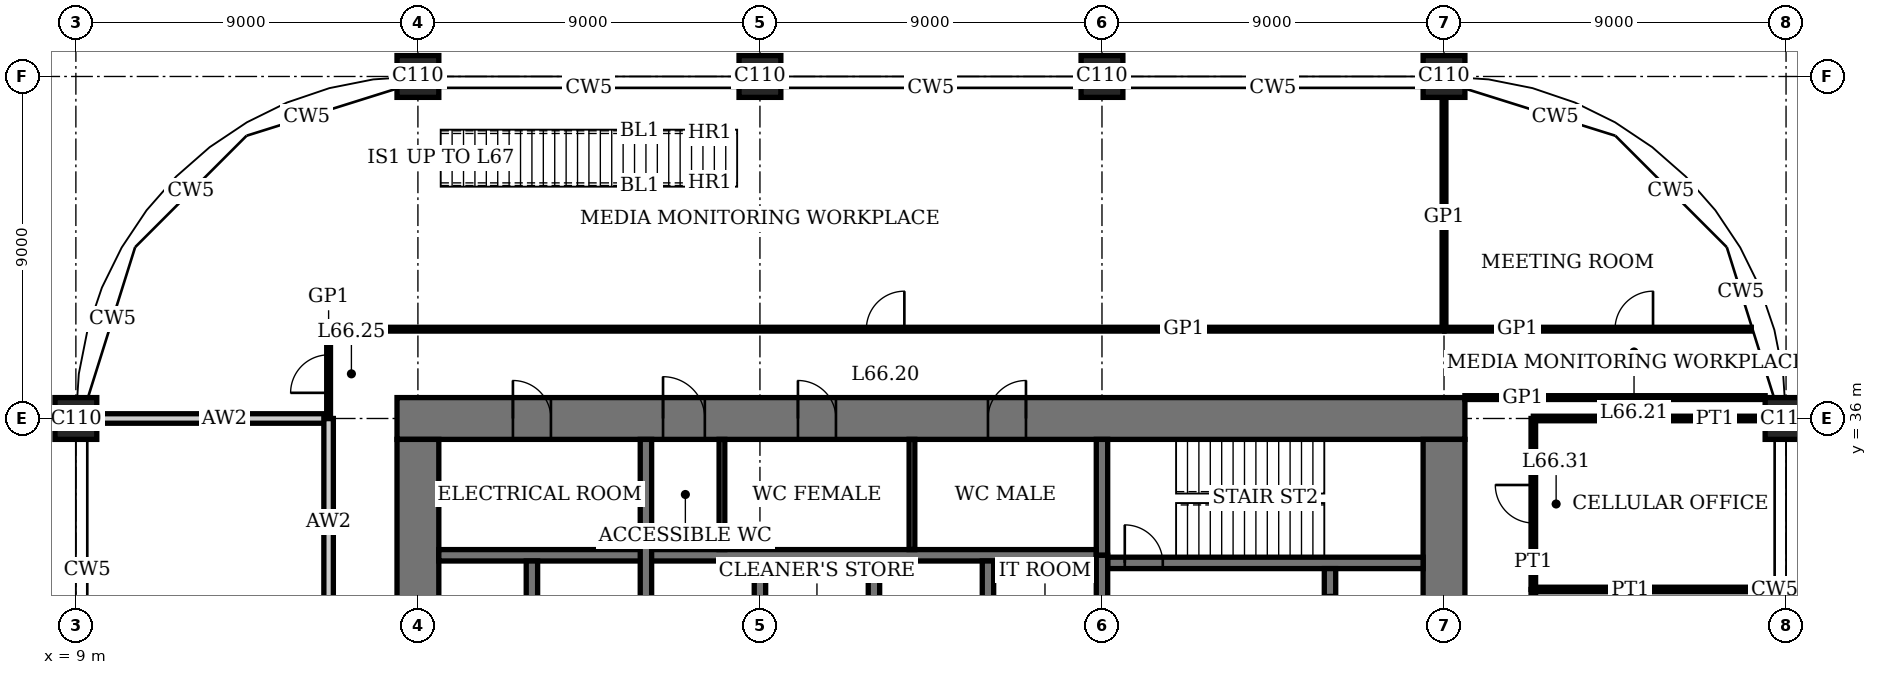
"""IFC4 building model, lengths in metres.
Left out: names, types, materials, properties, quantities, classifications, styles, units other than length and angle.
Written with IfcOpenShell. Run it as: python <this file> out.ifc"""

import sys

from ifc_helpers import new_model, si_unit, direction, frame, frame_2d, origin, origin_2d, place, context, subcontext, project, spatial, rectangle, extrude, element, fill, save


model = new_model("IFC4")
c1 = context("Model", 3, precision=1e-05, world=origin(), true_north=direction((0.0, 1.0)))
c2 = subcontext(c1, "Body", "Model", "MODEL_VIEW")
j1 = project(units=[si_unit("LENGTHUNIT", "METRE"), si_unit("PLANEANGLEUNIT", "RADIAN")], contexts=[c1])
p1 = place(None, origin())
s1 = spatial("IfcSite", under=j1, at=p1, CompositionType="ELEMENT")
p2 = place(p1, origin())
s2 = spatial("IfcBuilding", under=s1, at=p2, CompositionType="ELEMENT")
p3 = place(p2, frame((0.0, 0.0, 271.4)))
s3 = spatial("IfcBuildingStorey", under=s2, at=p3, CompositionType="ELEMENT", Elevation=271.4)
for number, where, z_axis, x_axis in (
    (1, (9.0, 36.0, 0.0), (0.0, 0.0, 1.0), (1.0, 0.0, 0.0)),
    (2, (18.0, 45.0, 0.0), (0.0, 0.0, 1.0), (1.0, 0.0, 0.0)),
    (3, (27.0, 45.0, 0.0), (0.0, 0.0, 1.0), (1.0, 0.0, 0.0)),
    (4, (36.0, 45.0, 0.0), (0.0, 0.0, 1.0), (1.0, 0.0, 0.0)),
    (5, (45.0, 45.0, 0.0), (0.0, 0.0, 1.0), (1.0, 0.0, 0.0)),
    (6, (54.0, 36.0, 0.0), (0.0, 0.0, 1.0), (1.0, 0.0, 0.0)),
):
    element("IfcColumn", number, at=place(p3, frame(where, z_axis=z_axis, x_axis=x_axis)), inside=s3, PredefinedType="COLUMN", context=c2, shape_type="SweptSolid", body=[
        extrude(rectangle(XDim=1.1, YDim=1.1, at=origin_2d()), origin(), (0.0, 0.0, 1.0), 4.0),
    ])
p4 = place(p3, frame((45.55, 36.0, 0.0), z_axis=(0.0, 0.0, 1.0), x_axis=(-1.0, 0.0, 0.0)))
e7 = element("IfcWall", 7, at=p4, inside=s3, PredefinedType="SHEAR", context=c2, shape_type="SweptSolid", body=[
    extrude(rectangle(XDim=28.1, YDim=1.1, at=frame_2d((14.05, 0.0))), origin(), (0.0, 0.0, 1.0), 4.0),
])
p5 = place(p4, frame((11.55, 0.0, 0.0)))
e8 = element("IfcOpeningElement", 8, at=p5, cuts=e7, PredefinedType="OPENING", context=c2, shape_type="SweptSolid", body=[
    extrude(rectangle(XDim=1.0, YDim=2.4, at=frame_2d((0.5, 1.2))), frame((0.0, 0.56, 0.0), z_axis=(0.0, -1.0, 0.0), x_axis=(1.0, 0.0, 0.0)), (0.0, 0.0, 1.0), 1.12),
])
p6 = place(p4, frame((16.55, 0.0, 0.0)))
e9 = element("IfcOpeningElement", 9, at=p6, cuts=e7, PredefinedType="OPENING", context=c2, shape_type="SweptSolid", body=[
    extrude(rectangle(XDim=1.0, YDim=2.4, at=frame_2d((0.5, 1.2))), frame((0.0, 0.56, 0.0), z_axis=(0.0, -1.0, 0.0), x_axis=(1.0, 0.0, 0.0)), (0.0, 0.0, 1.0), 1.12),
])
p7 = place(p4, frame((20.0, 0.0, 0.0)))
e10 = element("IfcOpeningElement", 10, at=p7, cuts=e7, PredefinedType="OPENING", context=c2, shape_type="SweptSolid", body=[
    extrude(rectangle(XDim=1.1, YDim=2.4, at=frame_2d((0.55, 1.2))), frame((0.0, 0.56, 0.0), z_axis=(0.0, -1.0, 0.0), x_axis=(1.0, 0.0, 0.0)), (0.0, 0.0, 1.0), 1.12),
])
p8 = place(p4, frame((24.05, 0.0, 0.0)))
e11 = element("IfcOpeningElement", 11, at=p8, cuts=e7, PredefinedType="OPENING", context=c2, shape_type="SweptSolid", body=[
    extrude(rectangle(XDim=1.0, YDim=2.4, at=frame_2d((0.5, 1.2))), frame((0.0, 0.56, 0.0), z_axis=(0.0, -1.0, 0.0), x_axis=(1.0, 0.0, 0.0)), (0.0, 0.0, 1.0), 1.12),
])
p9 = place(p3, frame((18.0, 35.45, 0.0), z_axis=(0.0, 0.0, 1.0), x_axis=(0.0, -1.0, 0.0)))
e12 = element("IfcWall", 12, at=p9, inside=s3, PredefinedType="SHEAR", context=c2, shape_type="SweptSolid", body=[
    extrude(rectangle(XDim=16.9, YDim=1.1, at=frame_2d((8.45, 0.0))), origin(), (0.0, 0.0, 1.0), 4.0),
])
p10 = place(p9, frame((8.45, 0.0, 0.0)))
e13 = element("IfcOpeningElement", 13, at=p10, cuts=e12, PredefinedType="OPENING", context=c2, shape_type="SweptSolid", body=[
    extrude(rectangle(XDim=1.8, YDim=2.4, at=frame_2d((0.9, 1.2))), frame((0.0, 0.56, 0.0), z_axis=(0.0, -1.0, 0.0), x_axis=(1.0, 0.0, 0.0)), (0.0, 0.0, 1.0), 1.12),
])
p11 = place(p3, frame((45.0, 18.55, 0.0), z_axis=(0.0, 0.0, 1.0), x_axis=(0.0, 1.0, 0.0)))
e14 = element("IfcWall", 14, at=p11, inside=s3, PredefinedType="SHEAR", context=c2, shape_type="SweptSolid", body=[
    extrude(rectangle(XDim=16.9, YDim=1.1, at=frame_2d((8.45, 0.0))), origin(), (0.0, 0.0, 1.0), 4.0),
])
p12 = place(p11, frame((8.45, 0.0, 0.0)))
e15 = element("IfcOpeningElement", 15, at=p12, cuts=e14, PredefinedType="OPENING", context=c2, shape_type="SweptSolid", body=[
    extrude(rectangle(XDim=1.8, YDim=2.4, at=frame_2d((0.9, 1.2))), frame((0.0, 0.56, 0.0), z_axis=(0.0, -1.0, 0.0), x_axis=(1.0, 0.0, 0.0)), (0.0, 0.0, 1.0), 1.12),
])
p13 = place(p3, frame((36.15, 32.2, 0.0), z_axis=(0.0, 0.0, 1.0), x_axis=(1.0, 0.0, 0.0)))
e16 = element("IfcWall", 16, at=p13, inside=s3, PredefinedType="SHEAR", context=c2, shape_type="SweptSolid", body=[
    extrude(rectangle(XDim=8.3, YDim=0.3, at=frame_2d((4.15, 0.0))), origin(), (0.0, 0.0, 1.0), 4.0),
])
p14 = place(p13, frame((0.45, 0.0, 0.0)))
e17 = element("IfcOpeningElement", 17, at=p14, cuts=e16, PredefinedType="OPENING", context=c2, shape_type="SweptSolid", body=[
    extrude(rectangle(XDim=1.0, YDim=2.4, at=frame_2d((0.5, 1.2))), frame((0.0, 0.16, 0.0), z_axis=(0.0, -1.0, 0.0), x_axis=(1.0, 0.0, 0.0)), (0.0, 0.0, 1.0), 0.32),
])
p15 = place(p3, frame((36.0, 32.4, 0.0), z_axis=(0.0, 0.0, 1.0), x_axis=(0.0, 1.0, 0.0)))
e18 = element("IfcWall", 18, at=p15, inside=s3, PredefinedType="SHEAR", context=c2, shape_type="SweptSolid", body=[
    extrude(rectangle(XDim=3.05, YDim=0.3, at=frame_2d((1.525, 0.0))), origin(), (0.0, 0.0, 1.0), 4.0),
])
p16 = place(p3, frame((42.0, 29.55, 0.0), z_axis=(0.0, 0.0, 1.0), x_axis=(0.0, 1.0, 0.0)))
e19 = element("IfcWall", 19, at=p16, inside=s3, PredefinedType="SHEAR", context=c2, shape_type="SweptSolid", body=[
    extrude(rectangle(XDim=2.5, YDim=0.3, at=frame_2d((1.25, 0.0))), origin(), (0.0, 0.0, 1.0), 4.0),
])
p17 = place(p16, frame((0.7, 0.0, 0.0)))
e20 = element("IfcOpeningElement", 20, at=p17, cuts=e19, PredefinedType="OPENING", context=c2, shape_type="SweptSolid", body=[
    extrude(rectangle(XDim=1.1, YDim=2.4, at=frame_2d((0.55, 1.2))), frame((0.0, 0.16, 0.0), z_axis=(0.0, -1.0, 0.0), x_axis=(1.0, 0.0, 0.0)), (0.0, 0.0, 1.0), 0.32),
])
p18 = place(p3, frame((18.55, 32.4, 0.0), z_axis=(0.0, 0.0, 1.0), x_axis=(1.0, 0.0, 0.0)))
e21 = element("IfcWall", 21, at=p18, inside=s3, PredefinedType="SHEAR", context=c2, shape_type="SweptSolid", body=[
    extrude(rectangle(XDim=17.3, YDim=0.3, at=frame_2d((8.65, 0.0))), origin(), (0.0, 0.0, 1.0), 4.0),
])
for number, where, z_axis, x_axis in (
    (22, (33.0, 29.55, 0.0), (0.0, 0.0, 1.0), (0.0, 1.0, 0.0)),
    (23, (30.0, 29.55, 0.0), (0.0, 0.0, 1.0), (0.0, 1.0, 0.0)),
    (24, (27.0, 29.55, 0.0), (0.0, 0.0, 1.0), (0.0, 1.0, 0.0)),
):
    element("IfcWall", number, at=place(p3, frame(where, z_axis=z_axis, x_axis=x_axis)), inside=s3, PredefinedType="SHEAR", context=c2, shape_type="SweptSolid", body=[
        extrude(rectangle(XDim=2.7, YDim=0.3, at=frame_2d((1.35, 0.0))), origin(), (0.0, 0.0, 1.0), 4.0),
    ])
p19 = place(p3, frame((24.0, 29.55, 0.0), z_axis=(0.0, 0.0, 1.0), x_axis=(0.0, 1.0, 0.0)))
e25 = element("IfcWall", 25, at=p19, inside=s3, PredefinedType="SHEAR", context=c2, shape_type="SweptSolid", body=[
    extrude(rectangle(XDim=5.9, YDim=0.3, at=frame_2d((2.95, 0.0))), origin(), (0.0, 0.0, 1.0), 4.0),
])
p20 = place(p3, frame((21.0, 29.55, 0.0), z_axis=(0.0, 0.0, 1.0), x_axis=(0.0, 1.0, 0.0)))
e26 = element("IfcWall", 26, at=p20, inside=s3, PredefinedType="SHEAR", context=c2, shape_type="SweptSolid", body=[
    extrude(rectangle(XDim=2.7, YDim=0.3, at=frame_2d((1.35, 0.0))), origin(), (0.0, 0.0, 1.0), 4.0),
])
p21 = place(p3, frame((36.0, 29.55, 0.0), z_axis=(0.0, 0.0, 1.0), x_axis=(0.0, 1.0, 0.0)))
e27 = element("IfcWall", 27, at=p21, inside=s3, PredefinedType="SHEAR", context=c2, shape_type="SweptSolid", body=[
    extrude(rectangle(XDim=2.85, YDim=0.3, at=frame_2d((1.425, 0.0))), origin(), (0.0, 0.0, 1.0), 4.0),
])
p22 = place(p3, frame((47.35, 31.5, 0.0), z_axis=(0.0, 0.0, 1.0), x_axis=(1.0, 0.0, 0.0)))
e28 = element("IfcWall", 28, at=p22, inside=s3, PredefinedType="PARTITIONING", context=c2, shape_type="SweptSolid", body=[
    extrude(rectangle(XDim=6.34, YDim=0.12, at=frame_2d((3.17, 0.0))), origin(), (0.0, 0.0, 1.0), 3.1),
])
p23 = place(p3, frame((9.55, 36.0, 0.0), z_axis=(0.0, 0.0, 1.0), x_axis=(1.0, 0.0, 0.0)))
e29 = element("IfcWall", 29, at=p23, inside=s3, PredefinedType="PARTITIONING", context=c2, shape_type="SweptSolid", body=[
    extrude(rectangle(XDim=6.1, YDim=0.25, at=frame_2d((3.05, 0.0))), origin(), (0.0, 0.0, 1.0), 3.05),
])
p24 = place(p3, frame((47.35, 36.0, 0.0), z_axis=(0.0, 0.0, 1.0), x_axis=(1.0, 0.0, 0.0)))
e30 = element("IfcWall", 30, at=p24, inside=s3, PredefinedType="PARTITIONING", context=c2, shape_type="SweptSolid", body=[
    extrude(rectangle(XDim=6.1, YDim=0.12, at=frame_2d((3.05, 0.0))), origin(), (0.0, 0.0, 1.0), 3.05),
])
p25 = place(p3, frame((45.55, 36.55, 0.0), z_axis=(0.0, 0.0, 1.0), x_axis=(1.0, 0.0, 0.0)))
e31 = element("IfcWall", 31, at=p25, inside=s3, PredefinedType="PARTITIONING", context=c2, shape_type="SweptSolid", body=[
    extrude(rectangle(XDim=7.9, YDim=0.1, at=frame_2d((3.95, 0.0))), origin(), (0.0, 0.0, 1.0), 3.75),
])
p26 = place(p3, frame((15.6, 38.35, 0.0), z_axis=(0.0, 0.0, 1.0), x_axis=(1.0, 0.0, 0.0)))
e32 = element("IfcWall", 32, at=p26, inside=s3, PredefinedType="PARTITIONING", context=c2, shape_type="SweptSolid", body=[
    extrude(rectangle(XDim=29.4, YDim=0.1, at=frame_2d((14.7, 0.0))), origin(), (0.0, 0.0, 1.0), 3.75),
])
p27 = place(p26, frame((14.2, 0.0, 0.0)))
e33 = element("IfcOpeningElement", 33, at=p27, cuts=e32, PredefinedType="OPENING", context=c2, shape_type="SweptSolid", body=[
    extrude(rectangle(XDim=1.0, YDim=2.4, at=frame_2d((0.5, 1.2))), frame((0.0, 0.06, 0.0), z_axis=(0.0, -1.0, 0.0), x_axis=(1.0, 0.0, 0.0)), (0.0, 0.0, 1.0), 0.12),
])
p28 = place(p3, frame((45.019, 38.35, 0.0), z_axis=(0.0, 0.0, 1.0), x_axis=(1.0, 0.0, 0.0)))
e34 = element("IfcWall", 34, at=p28, inside=s3, PredefinedType="PARTITIONING", context=c2, shape_type="SweptSolid", body=[
    extrude(rectangle(XDim=8.066, YDim=0.1, at=frame_2d((4.033, 0.0))), origin(), (0.0, 0.0, 1.0), 3.75),
])
p29 = place(p28, frame((4.481, 0.0, 0.0)))
e35 = element("IfcOpeningElement", 35, at=p29, cuts=e34, PredefinedType="OPENING", context=c2, shape_type="SweptSolid", body=[
    extrude(rectangle(XDim=1.0, YDim=2.4, at=frame_2d((0.5, 1.2))), frame((0.0, 0.06, 0.0), z_axis=(0.0, -1.0, 0.0), x_axis=(1.0, 0.0, 0.0)), (0.0, 0.0, 1.0), 0.12),
])
p30 = place(p3, frame((15.65, 22.5, 0.0), z_axis=(0.0, 0.0, 1.0), x_axis=(0.0, 1.0, 0.0)))
e36 = element("IfcWall", 36, at=p30, inside=s3, PredefinedType="PARTITIONING", context=c2, shape_type="SweptSolid", body=[
    extrude(rectangle(XDim=13.5, YDim=0.25, at=frame_2d((6.75, 0.0))), origin(), (0.0, 0.0, 1.0), 3.75),
])
p31 = place(p30, frame((5.85, 0.0, 0.0)))
e37 = element("IfcOpeningElement", 37, at=p31, cuts=e36, PredefinedType="OPENING", context=c2, shape_type="SweptSolid", body=[
    extrude(rectangle(XDim=1.8, YDim=2.4, at=frame_2d((0.9, 1.2))), frame((0.0, 0.135, 0.0), z_axis=(0.0, -1.0, 0.0), x_axis=(1.0, 0.0, 0.0)), (0.0, 0.0, 1.0), 0.27),
])
p32 = place(p3, frame((15.65, 36.0, 0.0), z_axis=(0.0, 0.0, 1.0), x_axis=(0.0, 1.0, 0.0)))
e38 = element("IfcWall", 38, at=p32, inside=s3, PredefinedType="PARTITIONING", context=c2, shape_type="SweptSolid", body=[
    extrude(rectangle(XDim=2.35, YDim=0.1, at=frame_2d((1.175, 0.0))), origin(), (0.0, 0.0, 1.0), 3.75),
])
p33 = place(p32, frame((0.675, 0.0, 0.0)))
e39 = element("IfcOpeningElement", 39, at=p33, cuts=e38, PredefinedType="OPENING", context=c2, shape_type="SweptSolid", body=[
    extrude(rectangle(XDim=1.0, YDim=2.4, at=frame_2d((0.5, 1.2))), frame((0.0, 0.06, 0.0), z_axis=(0.0, -1.0, 0.0), x_axis=(1.0, 0.0, 0.0)), (0.0, 0.0, 1.0), 0.12),
])
p34 = place(p3, frame((45.0, 38.35, 0.0), z_axis=(0.0, 0.0, 1.0), x_axis=(0.0, 1.0, 0.0)))
e40 = element("IfcWall", 40, at=p34, inside=s3, PredefinedType="PARTITIONING", context=c2, shape_type="SweptSolid", body=[
    extrude(rectangle(XDim=6.1, YDim=0.1, at=frame_2d((3.05, 0.0))), origin(), (0.0, 0.0, 1.0), 3.05),
])
p35 = place(p3, frame((47.35, 27.0, 0.0), z_axis=(0.0, 0.0, 1.0), x_axis=(0.0, 1.0, 0.0)))
e41 = element("IfcWall", 41, at=p35, inside=s3, PredefinedType="PARTITIONING", context=c2, shape_type="SweptSolid", body=[
    extrude(rectangle(XDim=4.5, YDim=0.12, at=frame_2d((2.25, 0.0))), origin(), (0.0, 0.0, 1.0), 3.75),
])
p36 = place(p35, frame((1.75, 0.0, 0.0)))
e42 = element("IfcOpeningElement", 42, at=p36, cuts=e41, PredefinedType="OPENING", context=c2, shape_type="SweptSolid", body=[
    extrude(rectangle(XDim=1.0, YDim=2.4, at=frame_2d((0.5, 1.2))), frame((0.0, 0.07, 0.0), z_axis=(0.0, -1.0, 0.0), x_axis=(1.0, 0.0, 0.0)), (0.0, 0.0, 1.0), 0.14),
])
p37 = place(p3, frame((47.35, 31.5, 0.0), z_axis=(0.0, 0.0, 1.0), x_axis=(0.0, 1.0, 0.0)))
e43 = element("IfcWall", 43, at=p37, inside=s3, PredefinedType="PARTITIONING", context=c2, shape_type="SweptSolid", body=[
    extrude(rectangle(XDim=4.5, YDim=0.12, at=frame_2d((2.25, 0.0))), origin(), (0.0, 0.0, 1.0), 3.75),
])
p38 = place(p37, frame((1.75, 0.0, 0.0)))
e44 = element("IfcOpeningElement", 44, at=p38, cuts=e43, PredefinedType="OPENING", context=c2, shape_type="SweptSolid", body=[
    extrude(rectangle(XDim=1.0, YDim=2.4, at=frame_2d((0.5, 1.2))), frame((0.0, 0.07, 0.0), z_axis=(0.0, -1.0, 0.0), x_axis=(1.0, 0.0, 0.0)), (0.0, 0.0, 1.0), 0.14),
])
for number, where, z_axis, x_axis in (
    (45, (31.0, 32.55, 0.0), (0.0, 0.0, 1.0), (0.0, 1.0, 0.0)),
    (46, (26.0, 32.55, 0.0), (0.0, 0.0, 1.0), (0.0, 1.0, 0.0)),
):
    element("IfcWall", number, at=place(p3, frame(where, z_axis=z_axis, x_axis=x_axis)), inside=s3, PredefinedType="PARTITIONING", context=c2, shape_type="SweptSolid", body=[
        extrude(rectangle(XDim=2.9, YDim=0.15, at=frame_2d((1.45, 0.0))), origin(), (0.0, 0.0, 1.0), 3.75),
    ])
p39 = place(p5, origin())
e47 = element("IfcDoor", 47, at=p39, inside=s3, OperationType="SINGLE_SWING_LEFT", PredefinedType="DOOR", context=c2, shape_type="SweptSolid", body=[
    extrude(rectangle(XDim=1.0, YDim=2.4, at=frame_2d((0.5, 1.2))), frame((0.0, 0.025, 0.0), z_axis=(0.0, -1.0, 0.0), x_axis=(1.0, 0.0, 0.0)), (0.0, 0.0, 1.0), 0.05),
    extrude(rectangle(XDim=0.04, YDim=2.4, at=frame_2d((0.02, 1.2))), frame((0.0, 0.4, 0.0), z_axis=(0.0, -1.0, 0.0), x_axis=(1.0, 0.0, 0.0)), (0.0, 0.0, 1.0), 0.8),
    extrude(rectangle(XDim=0.04, YDim=2.4, at=frame_2d((0.98, 1.2))), frame((0.0, 0.4, 0.0), z_axis=(0.0, -1.0, 0.0), x_axis=(1.0, 0.0, 0.0)), (0.0, 0.0, 1.0), 0.8),
    extrude(rectangle(XDim=1.0, YDim=0.04, at=frame_2d((0.5, 2.38))), frame((0.0, 0.4, 0.0), z_axis=(0.0, -1.0, 0.0), x_axis=(1.0, 0.0, 0.0)), (0.0, 0.0, 1.0), 0.8),
])
fill(e8, e47)
p40 = place(p6, origin())
e48 = element("IfcDoor", 48, at=p40, inside=s3, OperationType="SINGLE_SWING_RIGHT", PredefinedType="DOOR", context=c2, shape_type="SweptSolid", body=[
    extrude(rectangle(XDim=1.0, YDim=2.4, at=frame_2d((0.5, 1.2))), frame((0.0, 0.025, 0.0), z_axis=(0.0, -1.0, 0.0), x_axis=(1.0, 0.0, 0.0)), (0.0, 0.0, 1.0), 0.05),
    extrude(rectangle(XDim=0.04, YDim=2.4, at=frame_2d((0.02, 1.2))), frame((0.0, 0.4, 0.0), z_axis=(0.0, -1.0, 0.0), x_axis=(1.0, 0.0, 0.0)), (0.0, 0.0, 1.0), 0.8),
    extrude(rectangle(XDim=0.04, YDim=2.4, at=frame_2d((0.98, 1.2))), frame((0.0, 0.4, 0.0), z_axis=(0.0, -1.0, 0.0), x_axis=(1.0, 0.0, 0.0)), (0.0, 0.0, 1.0), 0.8),
    extrude(rectangle(XDim=1.0, YDim=0.04, at=frame_2d((0.5, 2.38))), frame((0.0, 0.4, 0.0), z_axis=(0.0, -1.0, 0.0), x_axis=(1.0, 0.0, 0.0)), (0.0, 0.0, 1.0), 0.8),
])
fill(e9, e48)
p41 = place(p7, origin())
e49 = element("IfcDoor", 49, at=p41, inside=s3, OperationType="SINGLE_SWING_RIGHT", PredefinedType="DOOR", context=c2, shape_type="SweptSolid", body=[
    extrude(rectangle(XDim=1.1, YDim=2.4, at=frame_2d((0.55, 1.2))), frame((0.0, 0.025, 0.0), z_axis=(0.0, -1.0, 0.0), x_axis=(1.0, 0.0, 0.0)), (0.0, 0.0, 1.0), 0.05),
    extrude(rectangle(XDim=0.04, YDim=2.4, at=frame_2d((0.02, 1.2))), frame((0.0, 0.44, 0.0), z_axis=(0.0, -1.0, 0.0), x_axis=(1.0, 0.0, 0.0)), (0.0, 0.0, 1.0), 0.88),
    extrude(rectangle(XDim=0.04, YDim=2.4, at=frame_2d((1.08, 1.2))), frame((0.0, 0.44, 0.0), z_axis=(0.0, -1.0, 0.0), x_axis=(1.0, 0.0, 0.0)), (0.0, 0.0, 1.0), 0.88),
    extrude(rectangle(XDim=1.1, YDim=0.04, at=frame_2d((0.55, 2.38))), frame((0.0, 0.44, 0.0), z_axis=(0.0, -1.0, 0.0), x_axis=(1.0, 0.0, 0.0)), (0.0, 0.0, 1.0), 0.88),
])
fill(e10, e49)
p42 = place(p8, origin())
e50 = element("IfcDoor", 50, at=p42, inside=s3, OperationType="SINGLE_SWING_RIGHT", PredefinedType="DOOR", context=c2, shape_type="SweptSolid", body=[
    extrude(rectangle(XDim=1.0, YDim=2.4, at=frame_2d((0.5, 1.2))), frame((0.0, 0.025, 0.0), z_axis=(0.0, -1.0, 0.0), x_axis=(1.0, 0.0, 0.0)), (0.0, 0.0, 1.0), 0.05),
    extrude(rectangle(XDim=0.04, YDim=2.4, at=frame_2d((0.02, 1.2))), frame((0.0, 0.4, 0.0), z_axis=(0.0, -1.0, 0.0), x_axis=(1.0, 0.0, 0.0)), (0.0, 0.0, 1.0), 0.8),
    extrude(rectangle(XDim=0.04, YDim=2.4, at=frame_2d((0.98, 1.2))), frame((0.0, 0.4, 0.0), z_axis=(0.0, -1.0, 0.0), x_axis=(1.0, 0.0, 0.0)), (0.0, 0.0, 1.0), 0.8),
    extrude(rectangle(XDim=1.0, YDim=0.04, at=frame_2d((0.5, 2.38))), frame((0.0, 0.4, 0.0), z_axis=(0.0, -1.0, 0.0), x_axis=(1.0, 0.0, 0.0)), (0.0, 0.0, 1.0), 0.8),
])
fill(e11, e50)
p43 = place(p14, origin())
e51 = element("IfcDoor", 51, at=p43, inside=s3, OperationType="SINGLE_SWING_RIGHT", PredefinedType="DOOR", context=c2, shape_type="SweptSolid", body=[
    extrude(rectangle(XDim=1.0, YDim=2.4, at=frame_2d((0.5, 1.2))), frame((0.0, 0.03, 0.0), z_axis=(0.0, -1.0, 0.0), x_axis=(1.0, 0.0, 0.0)), (0.0, 0.0, 1.0), 0.06),
])
fill(e17, e51)
p44 = place(p27, origin())
e52 = element("IfcDoor", 52, at=p44, inside=s3, OperationType="SINGLE_SWING_LEFT", PredefinedType="DOOR", context=c2, shape_type="SweptSolid", body=[
    extrude(rectangle(XDim=1.0, YDim=2.4, at=frame_2d((0.5, 1.2))), frame((0.0, 0.02, 0.0), z_axis=(0.0, -1.0, 0.0), x_axis=(1.0, 0.0, 0.0)), (0.0, 0.0, 1.0), 0.04),
])
fill(e33, e52)
p45 = place(p29, origin())
e53 = element("IfcDoor", 53, at=p45, inside=s3, OperationType="SINGLE_SWING_LEFT", PredefinedType="DOOR", context=c2, shape_type="SweptSolid", body=[
    extrude(rectangle(XDim=1.0, YDim=2.4, at=frame_2d((0.5, 1.2))), frame((0.0, 0.02, 0.0), z_axis=(0.0, -1.0, 0.0), x_axis=(1.0, 0.0, 0.0)), (0.0, 0.0, 1.0), 0.04),
])
fill(e35, e53)
p46 = place(p33, origin())
e54 = element("IfcDoor", 54, at=p46, inside=s3, OperationType="SINGLE_SWING_RIGHT", PredefinedType="DOOR", context=c2, shape_type="SweptSolid", body=[
    extrude(rectangle(XDim=1.0, YDim=2.4, at=frame_2d((0.5, 1.2))), frame((0.0, 0.02, 0.0), z_axis=(0.0, -1.0, 0.0), x_axis=(1.0, 0.0, 0.0)), (0.0, 0.0, 1.0), 0.04),
])
fill(e39, e54)
p47 = place(p38, origin())
e55 = element("IfcDoor", 55, at=p47, inside=s3, OperationType="SINGLE_SWING_LEFT", PredefinedType="DOOR", context=c2, shape_type="SweptSolid", body=[
    extrude(rectangle(XDim=1.0, YDim=2.4, at=frame_2d((0.5, 1.2))), frame((0.0, 0.025, 0.0), z_axis=(0.0, -1.0, 0.0), x_axis=(1.0, 0.0, 0.0)), (0.0, 0.0, 1.0), 0.05),
])
fill(e44, e55)
save(model, sys.argv[1])
